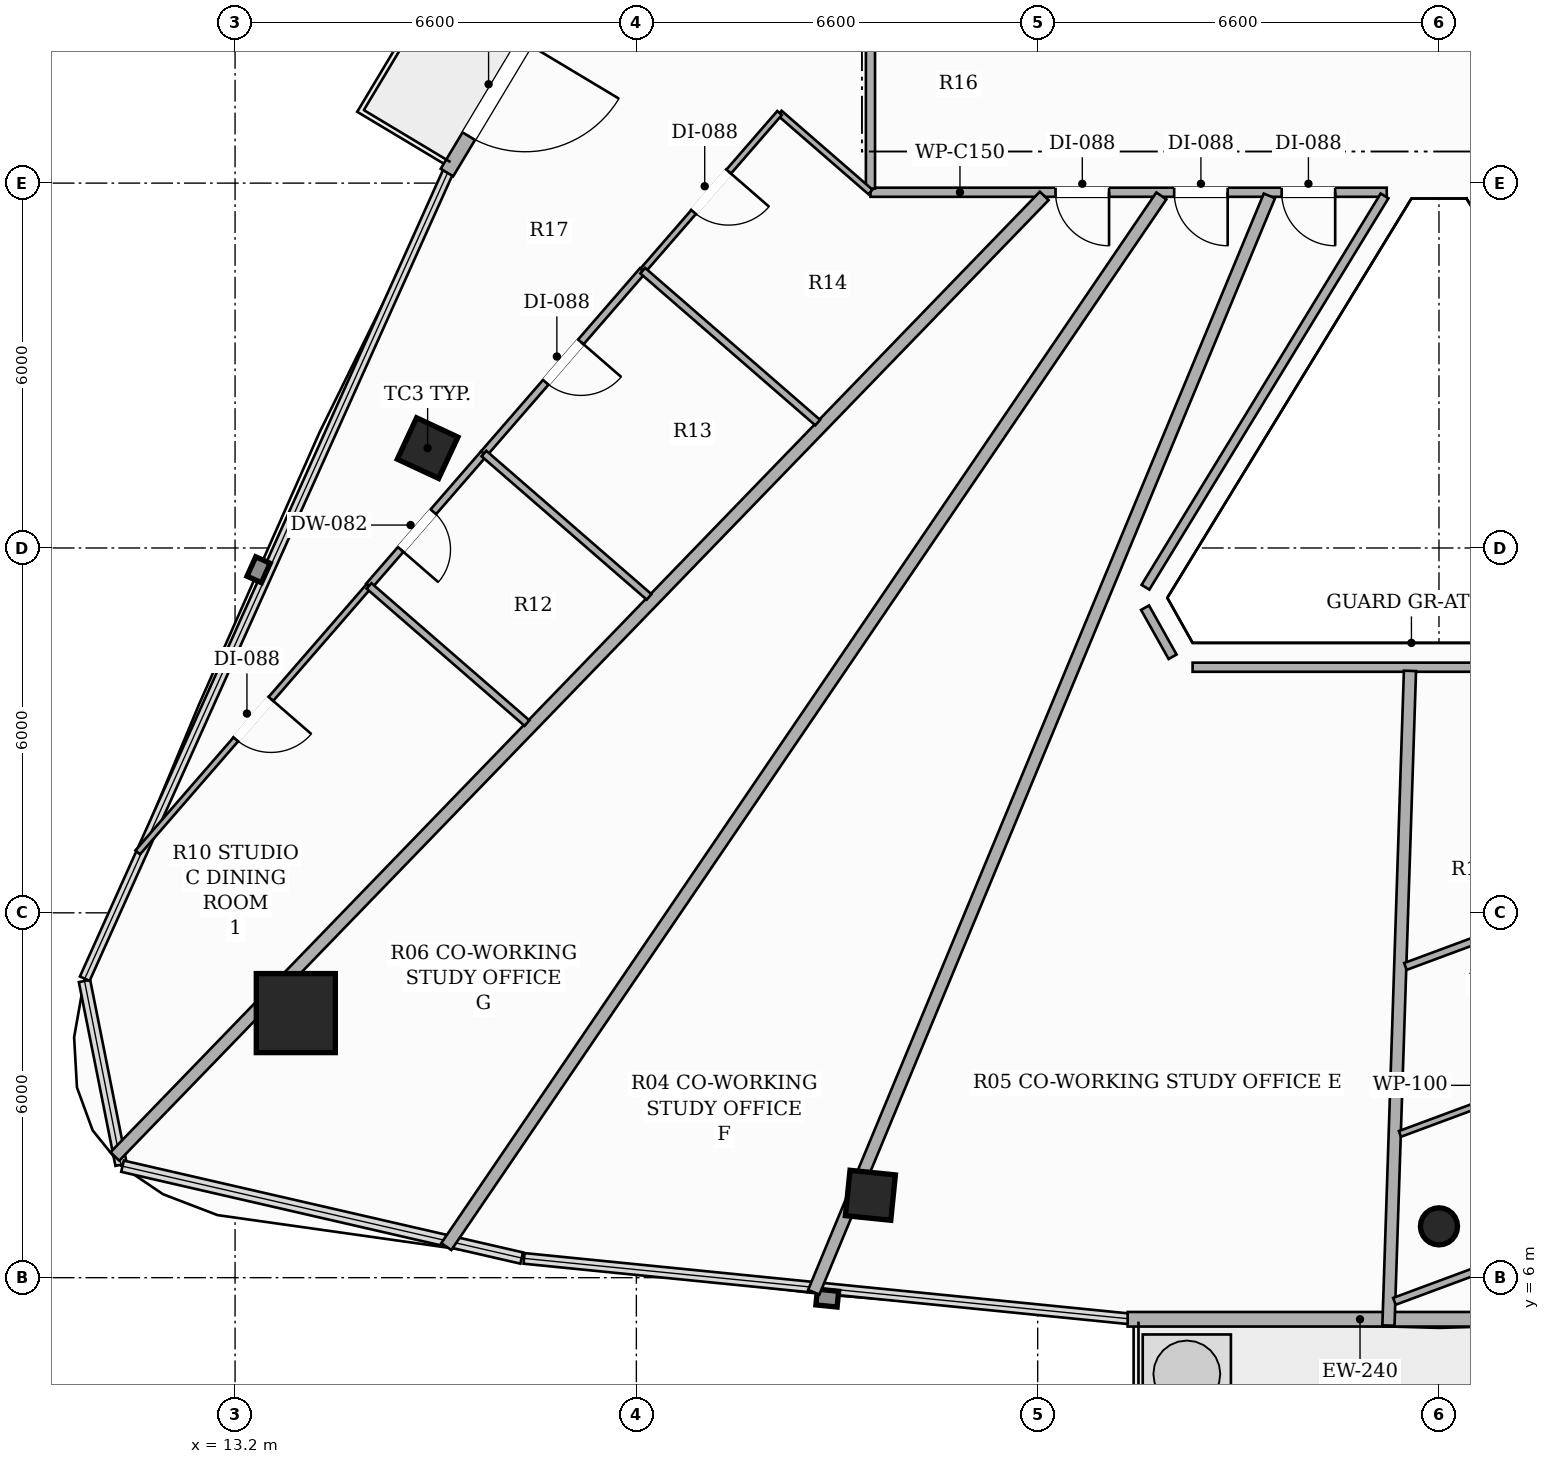
"""IFC4 building model, lengths in metres.
Left out: names, types, materials, properties, quantities, classifications, styles, units other than length and angle.
Written with IfcOpenShell. Run it as: python <this file> out.ifc"""

import sys

from ifc_helpers import new_model, si_unit, direction, frame, frame_2d, origin, origin_2d, place, context, subcontext, project, spatial, rectangle, hollow_rectangle, hollow_circle, extrude, element, fill, save


model = new_model("IFC4")
c1 = context("Model", 3, precision=1e-05, world=origin(), true_north=direction((0.0, 1.0)))
c2 = subcontext(c1, "Body", "Model", "MODEL_VIEW")
j1 = project(units=[si_unit("LENGTHUNIT", "METRE"), si_unit("PLANEANGLEUNIT", "RADIAN")], contexts=[c1])
p1 = place(None, origin())
s1 = spatial("IfcSite", under=j1, at=p1, CompositionType="ELEMENT")
p2 = place(p1, origin())
s2 = spatial("IfcBuilding", under=s1, at=p2, CompositionType="ELEMENT")
p3 = place(p2, frame((0.0, 0.0, 243.65)))
s3 = spatial("IfcBuildingStorey", under=s2, at=p3, CompositionType="ELEMENT", Elevation=243.65)
p4 = place(p3, frame((14.199, 10.351, 0.0), z_axis=(0.0, 0.0, 1.0), x_axis=(1.0, 0.0, 0.0)))
e1 = element("IfcColumn", 1, at=p4, inside=s3, PredefinedType="COLUMN", context=c2, shape_type="SweptSolid", body=[
    extrude(hollow_rectangle(XDim=1.3, YDim=1.3, WallThickness=0.04, at=origin_2d()), origin(), (0.0, 0.0, 1.0), 3.3),
])
for number, where, z_axis, x_axis in (
    (2, (16.367, 19.642, 0.0), (0.0, 0.0, 1.0), (0.423, 0.906, 0.0)),
    (3, (23.649, 7.355, 0.0), (0.0, 0.0, 1.0), (-0.995, 0.101, 0.0)),
):
    element("IfcColumn", number, at=place(p3, frame(where, z_axis=z_axis, x_axis=x_axis)), inside=s3, PredefinedType="COLUMN", context=c2, shape_type="SweptSolid", body=[
        extrude(hollow_rectangle(XDim=0.75, YDim=0.75, WallThickness=0.025, at=origin_2d()), origin(), (0.0, 0.0, 1.0), 3.3),
    ])
p5 = place(p3, frame((33.0, 6.844, 0.0), z_axis=(0.0, 0.0, 1.0), x_axis=(1.0, 0.0, 0.0)))
e4 = element("IfcColumn", 4, at=p5, inside=s3, PredefinedType="COLUMN", context=c2, shape_type="SweptSolid", body=[
    extrude(hollow_circle(Radius=0.305, WallThickness=0.016, at=origin_2d()), origin(), (0.0, 0.0, 1.0), 3.3),
])
p6 = place(p3, frame((21.775, 32.66, 0.0), z_axis=(0.0, 0.0, 1.0), x_axis=(-0.514372387577, -0.857566934354, 0.0)))
e5 = element("IfcWall", 5, at=p6, inside=s3, PredefinedType="SOLIDWALL", context=c2, shape_type="SweptSolid", body=[
    extrude(rectangle(XDim=9.895, YDim=0.24, at=frame_2d((4.948, 0.0))), origin(), (0.0, 0.0, 1.0), 2.624),
])
p7 = place(p6, frame((7.398, 0.0, 0.0)))
e6 = element("IfcOpeningElement", 6, at=p7, cuts=e5, PredefinedType="OPENING", context=c2, shape_type="SweptSolid", body=[
    extrude(rectangle(XDim=1.8, YDim=2.2, at=frame_2d((0.9, 1.1))), frame((0.0, 0.13, 0.0), z_axis=(0.0, -1.0, 0.0), x_axis=(1.0, 0.0, 0.0)), (0.0, 0.0, 1.0), 0.26),
])
p8 = place(p3, frame((27.88, 5.316, 0.0), z_axis=(0.0, 0.0, 1.0), x_axis=(1.0, 0.0, 0.0)))
e7 = element("IfcWall", 7, at=p8, inside=s3, PredefinedType="SOLIDWALL", context=c2, shape_type="SweptSolid", body=[
    extrude(rectangle(XDim=10.24, YDim=0.24, at=frame_2d((5.12, 0.0))), origin(), (0.0, 0.0, 1.0), 2.624),
])
p9 = place(p8, frame((7.743, 0.0, 0.0)))
e8 = element("IfcOpeningElement", 8, at=p9, cuts=e7, PredefinedType="OPENING", context=c2, shape_type="SweptSolid", body=[
    extrude(rectangle(XDim=1.8, YDim=2.2, at=frame_2d((0.9, 1.1))), frame((0.0, 0.13, 0.0), z_axis=(0.0, -1.0, 0.0), x_axis=(1.0, 0.0, 0.0)), (0.0, 0.0, 1.0), 0.26),
])
p10 = place(p3, frame((32.141, 23.85, 0.0), z_axis=(0.0, 0.0, 1.0), x_axis=(-1.0, 0.0, 0.0)))
e9 = element("IfcWall", 9, at=p10, inside=s3, PredefinedType="PARTITIONING", context=c2, shape_type="SweptSolid", body=[
    extrude(rectangle(XDim=8.491, YDim=0.15, at=frame_2d((4.246, 0.0))), origin(), (0.0, 0.0, 1.0), 2.565),
])
p11 = place(p10, frame((0.848, 0.0, 0.0)))
e10 = element("IfcOpeningElement", 10, at=p11, cuts=e9, PredefinedType="OPENING", context=c2, shape_type="SweptSolid", body=[
    extrude(rectangle(XDim=0.88, YDim=2.1, at=frame_2d((0.44, 1.05))), frame((0.0, 0.085, 0.0), z_axis=(0.0, -1.0, 0.0), x_axis=(1.0, 0.0, 0.0)), (0.0, 0.0, 1.0), 0.17),
])
p12 = place(p10, frame((2.616, 0.0, 0.0)))
e11 = element("IfcOpeningElement", 11, at=p12, cuts=e9, PredefinedType="OPENING", context=c2, shape_type="SweptSolid", body=[
    extrude(rectangle(XDim=0.88, YDim=2.1, at=frame_2d((0.44, 1.05))), frame((0.0, 0.085, 0.0), z_axis=(0.0, -1.0, 0.0), x_axis=(1.0, 0.0, 0.0)), (0.0, 0.0, 1.0), 0.17),
])
p13 = place(p10, frame((4.567, 0.0, 0.0)))
e12 = element("IfcOpeningElement", 12, at=p13, cuts=e9, PredefinedType="OPENING", context=c2, shape_type="SweptSolid", body=[
    extrude(rectangle(XDim=0.88, YDim=2.1, at=frame_2d((0.44, 1.05))), frame((0.0, 0.085, 0.0), z_axis=(0.0, -1.0, 0.0), x_axis=(1.0, 0.0, 0.0)), (0.0, 0.0, 1.0), 0.17),
])
p14 = place(p3, frame((23.65, 23.91, 0.0), z_axis=(0.0, 0.0, 1.0), x_axis=(0.0, 1.0, 0.0)))
e13 = element("IfcWall", 13, at=p14, inside=s3, PredefinedType="PARTITIONING", context=c2, shape_type="SweptSolid", body=[
    extrude(rectangle(XDim=11.337, YDim=0.15, at=frame_2d((5.668, 0.0))), origin(), (0.0, 0.0, 1.0), 2.492),
])
p15 = place(p14, frame((4.694, 0.0, 0.0)))
e14 = element("IfcOpeningElement", 14, at=p15, cuts=e13, PredefinedType="OPENING", context=c2, shape_type="SweptSolid", body=[
    extrude(rectangle(XDim=0.92, YDim=2.15, at=frame_2d((0.46, 1.075))), frame((0.0, 0.085, 0.0), z_axis=(0.0, -1.0, 0.0), x_axis=(1.0, 0.0, 0.0)), (0.0, 0.0, 1.0), 0.17),
])
p16 = place(p3, frame((37.052, 16.039, 0.0), z_axis=(0.0, 0.0, 1.0), x_axis=(-1.0, 0.0, 0.0)))
e15 = element("IfcWall", 15, at=p16, inside=s3, PredefinedType="PARTITIONING", context=c2, shape_type="SweptSolid", body=[
    extrude(rectangle(XDim=8.104, YDim=0.15, at=frame_2d((4.052, 0.0))), origin(), (0.0, 0.0, 1.0), 2.773),
])
p17 = place(p3, frame((28.619, 16.211, 0.0), z_axis=(0.0, 0.0, 1.0), x_axis=(-0.489334167997, 0.872096366252, 0.0)))
e16 = element("IfcWall", 16, at=p17, inside=s3, PredefinedType="PARTITIONING", context=c2, shape_type="SweptSolid", body=[
    extrude(rectangle(XDim=0.926, YDim=0.15, at=frame_2d((0.463, 0.0))), origin(), (0.0, 0.0, 1.0), 3.06),
])
p18 = place(p3, frame((28.173, 17.354, 0.0), z_axis=(0.0, 0.0, 1.0), x_axis=(0.521329541742, 0.85335544113, 0.0)))
e17 = element("IfcWall", 17, at=p18, inside=s3, PredefinedType="PARTITIONING", context=c2, shape_type="SweptSolid", body=[
    extrude(rectangle(XDim=7.542, YDim=0.15, at=frame_2d((3.771, 0.0))), origin(), (0.0, 0.0, 1.0), 2.773),
])
p19 = place(p3, frame((32.169, 5.213, 0.0), z_axis=(0.0, 0.0, 1.0), x_axis=(0.032863548895, 0.999459847695, 0.0)))
e18 = element("IfcWall", 18, at=p19, inside=s3, PredefinedType="PARTITIONING", context=c2, shape_type="SweptSolid", body=[
    extrude(rectangle(XDim=10.772, YDim=0.2, at=frame_2d((5.386, 0.0))), origin(), (0.0, 0.0, 1.0), 2.492),
])
p20 = place(p3, frame((26.508, 23.79, 0.0), z_axis=(0.0, 0.0, 1.0), x_axis=(-0.695365551949, -0.71865621069, 0.0)))
e19 = element("IfcWall", 19, at=p20, inside=s3, PredefinedType="PARTITIONING", context=c2, shape_type="SweptSolid", body=[
    extrude(rectangle(XDim=21.981, YDim=0.2, at=frame_2d((10.991, 0.0))), origin(), (0.0, 0.0, 1.0), 2.492),
])
p21 = place(p3, frame((22.717, 5.761, 0.0), z_axis=(0.0, 0.0, 1.0), x_axis=(0.383820587854, 0.923407686961, 0.0)))
e20 = element("IfcWall", 20, at=p21, inside=s3, PredefinedType="PARTITIONING", context=c2, shape_type="SweptSolid", body=[
    extrude(rectangle(XDim=19.524, YDim=0.2, at=frame_2d((9.762, 0.0))), origin(), (0.0, 0.0, 1.0), 2.492),
])
p22 = place(p3, frame((16.674, 6.511, 0.0), z_axis=(0.0, 0.0, 1.0), x_axis=(0.562645442508, 0.82669831621, 0.0)))
e21 = element("IfcWall", 21, at=p22, inside=s3, PredefinedType="PARTITIONING", context=c2, shape_type="SweptSolid", body=[
    extrude(rectangle(XDim=20.901, YDim=0.2, at=frame_2d((10.451, 0.0))), origin(), (0.0, 0.0, 1.0), 2.492),
])
p23 = place(p3, frame((35.781, 12.353, 0.0), z_axis=(0.0, 0.0, 1.0), x_axis=(-0.937688263894, -0.347477653607, 0.0)))
e22 = element("IfcWall", 22, at=p23, inside=s3, PredefinedType="PARTITIONING", context=c2, shape_type="SweptSolid", body=[
    extrude(rectangle(XDim=3.554, YDim=0.12, at=frame_2d((1.777, 0.0))), origin(), (0.0, 0.0, 1.0), 2.773),
])
p24 = place(p3, frame((32.267, 5.611, 0.0), z_axis=(0.0, 0.0, 1.0), x_axis=(0.937641120959, 0.347604845027, 0.0)))
e23 = element("IfcWall", 23, at=p24, inside=s3, PredefinedType="PARTITIONING", context=c2, shape_type="SweptSolid", body=[
    extrude(rectangle(XDim=5.638, YDim=0.12, at=frame_2d((2.819, 0.0))), origin(), (0.0, 0.0, 1.0), 2.492),
])
p25 = place(p3, frame((32.358, 8.364, 0.0), z_axis=(0.0, 0.0, 1.0), x_axis=(0.937636593966, 0.34761705605, 0.0)))
e24 = element("IfcWall", 24, at=p25, inside=s3, PredefinedType="PARTITIONING", context=c2, shape_type="SweptSolid", body=[
    extrude(rectangle(XDim=4.597, YDim=0.1, at=frame_2d((2.298, 0.0))), origin(), (0.0, 0.0, 1.0), 2.773),
])
p26 = place(p3, frame((17.293, 19.553, 0.0), z_axis=(0.0, 0.0, 1.0), x_axis=(-0.655555788219, -0.755146746357, 0.0)))
e25 = element("IfcWall", 25, at=p26, inside=s3, PredefinedType="PARTITIONING", context=c2, shape_type="SweptSolid", body=[
    extrude(rectangle(XDim=2.883, YDim=0.12, at=frame_2d((1.441, 0.0))), origin(), (0.0, 0.0, 1.0), 2.492),
])
p27 = place(p26, frame((1.269, 0.0, 0.0)))
e26 = element("IfcOpeningElement", 26, at=p27, cuts=e25, PredefinedType="OPENING", context=c2, shape_type="SweptSolid", body=[
    extrude(rectangle(XDim=0.82, YDim=2.1, at=frame_2d((0.41, 1.05))), frame((0.0, 0.07, 0.0), z_axis=(0.0, -1.0, 0.0), x_axis=(1.0, 0.0, 0.0)), (0.0, 0.0, 1.0), 0.14),
])
p28 = place(p3, frame((19.904, 22.561, 0.0), z_axis=(0.0, 0.0, 1.0), x_axis=(-0.655518370372, -0.755179227803, 0.0)))
e27 = element("IfcWall", 27, at=p28, inside=s3, PredefinedType="PARTITIONING", context=c2, shape_type="SweptSolid", body=[
    extrude(rectangle(XDim=3.983, YDim=0.12, at=frame_2d((1.992, 0.0))), origin(), (0.0, 0.0, 1.0), 2.773),
])
p29 = place(p28, frame((1.552, 0.0, 0.0)))
e28 = element("IfcOpeningElement", 28, at=p29, cuts=e27, PredefinedType="OPENING", context=c2, shape_type="SweptSolid", body=[
    extrude(rectangle(XDim=0.88, YDim=2.1, at=frame_2d((0.44, 1.05))), frame((0.0, 0.07, 0.0), z_axis=(0.0, -1.0, 0.0), x_axis=(1.0, 0.0, 0.0)), (0.0, 0.0, 1.0), 0.14),
])
p30 = place(p3, frame((15.403, 17.376, 0.0), z_axis=(0.0, 0.0, 1.0), x_axis=(-0.655535791639, -0.755164105265, 0.0)))
e29 = element("IfcWall", 29, at=p30, inside=s3, PredefinedType="PARTITIONING", context=c2, shape_type="SweptSolid", body=[
    extrude(rectangle(XDim=5.803, YDim=0.1, at=frame_2d((2.901, 0.0))), origin(), (0.0, 0.0, 1.0), 2.492),
])
p31 = place(p30, frame((2.461, 0.0, 0.0)))
e30 = element("IfcOpeningElement", 30, at=p31, cuts=e29, PredefinedType="OPENING", context=c2, shape_type="SweptSolid", body=[
    extrude(rectangle(XDim=0.88, YDim=2.1, at=frame_2d((0.44, 1.05))), frame((0.0, 0.06, 0.0), z_axis=(0.0, -1.0, 0.0), x_axis=(1.0, 0.0, 0.0)), (0.0, 0.0, 1.0), 0.12),
])
p32 = place(p3, frame((23.65, 23.855, 0.0), z_axis=(0.0, 0.0, 1.0), x_axis=(-0.755054003076, 0.655662605643, 0.0)))
e31 = element("IfcWall", 31, at=p32, inside=s3, PredefinedType="PARTITIONING", context=c2, shape_type="SweptSolid", body=[
    extrude(rectangle(XDim=1.98, YDim=0.1, at=frame_2d((0.99, 0.0))), origin(), (0.0, 0.0, 1.0), 2.773),
])
p33 = place(p3, frame((22.155, 25.153, 0.0), z_axis=(0.0, 0.0, 1.0), x_axis=(-0.655685588572, -0.755034044888, 0.0)))
e32 = element("IfcWall", 32, at=p33, inside=s3, PredefinedType="PARTITIONING", context=c2, shape_type="SweptSolid", body=[
    extrude(rectangle(XDim=3.433, YDim=0.1, at=frame_2d((1.717, 0.0))), origin(), (0.0, 0.0, 1.0), 2.773),
])
p34 = place(p33, frame((1.276, 0.0, 0.0)))
e33 = element("IfcOpeningElement", 33, at=p34, cuts=e32, PredefinedType="OPENING", context=c2, shape_type="SweptSolid", body=[
    extrude(rectangle(XDim=0.88, YDim=2.1, at=frame_2d((0.44, 1.05))), frame((0.0, 0.06, 0.0), z_axis=(0.0, -1.0, 0.0), x_axis=(1.0, 0.0, 0.0)), (0.0, 0.0, 1.0), 0.12),
])
p35 = place(p3, frame((17.293, 19.553, 0.0), z_axis=(0.0, 0.0, 1.0), x_axis=(0.755140110276, -0.655563432364, 0.0)))
e34 = element("IfcWall", 34, at=p35, inside=s3, PredefinedType="PARTITIONING", context=c2, shape_type="SweptSolid", body=[
    extrude(rectangle(XDim=3.597, YDim=0.12, at=frame_2d((1.798, 0.0))), origin(), (0.0, 0.0, 1.0), 2.565),
])
p36 = place(p3, frame((18.001, 15.12, 0.0), z_axis=(0.0, 0.0, 1.0), x_axis=(-0.755063624175, 0.655651525925, 0.0)))
e35 = element("IfcWall", 35, at=p36, inside=s3, PredefinedType="PARTITIONING", context=c2, shape_type="SweptSolid", body=[
    extrude(rectangle(XDim=3.441, YDim=0.12, at=frame_2d((1.72, 0.0))), origin(), (0.0, 0.0, 1.0), 2.492),
])
p37 = place(p3, frame((19.904, 22.561, 0.0), z_axis=(0.0, 0.0, 1.0), x_axis=(0.755063159293, -0.655652061293, 0.0)))
e36 = element("IfcWall", 36, at=p37, inside=s3, PredefinedType="PARTITIONING", context=c2, shape_type="SweptSolid", body=[
    extrude(rectangle(XDim=3.812, YDim=0.12, at=frame_2d((1.906, 0.0))), origin(), (0.0, 0.0, 1.0), 2.565),
])
p38 = place(p7, origin())
e37 = element("IfcDoor", 37, at=p38, inside=s3, OperationType="SINGLE_SWING_LEFT", PredefinedType="DOOR", context=c2, shape_type="SweptSolid", body=[
    extrude(rectangle(XDim=1.8, YDim=2.2, at=frame_2d((0.9, 1.1))), frame((0.0, 0.025, 0.0), z_axis=(0.0, -1.0, 0.0), x_axis=(1.0, 0.0, 0.0)), (0.0, 0.0, 1.0), 0.05),
])
fill(e6, e37)
p39 = place(p27, origin())
e38 = element("IfcDoor", 38, at=p39, inside=s3, OperationType="SINGLE_SWING_RIGHT", PredefinedType="DOOR", context=c2, shape_type="SweptSolid", body=[
    extrude(rectangle(XDim=0.82, YDim=2.1, at=frame_2d((0.41, 1.05))), frame((0.0, 0.025, 0.0), z_axis=(0.0, -1.0, 0.0), x_axis=(1.0, 0.0, 0.0)), (0.0, 0.0, 1.0), 0.05),
])
fill(e26, e38)
p40 = place(p29, origin())
e39 = element("IfcDoor", 39, at=p40, inside=s3, OperationType="SINGLE_SWING_LEFT", PredefinedType="DOOR", context=c2, shape_type="SweptSolid", body=[
    extrude(rectangle(XDim=0.88, YDim=2.1, at=frame_2d((0.44, 1.05))), frame((0.0, 0.025, 0.0), z_axis=(0.0, -1.0, 0.0), x_axis=(1.0, 0.0, 0.0)), (0.0, 0.0, 1.0), 0.05),
])
fill(e28, e39)
p41 = place(p31, origin())
e40 = element("IfcDoor", 40, at=p41, inside=s3, OperationType="SINGLE_SWING_LEFT", PredefinedType="DOOR", context=c2, shape_type="SweptSolid", body=[
    extrude(rectangle(XDim=0.88, YDim=2.1, at=frame_2d((0.44, 1.05))), frame((0.0, 0.025, 0.0), z_axis=(0.0, -1.0, 0.0), x_axis=(1.0, 0.0, 0.0)), (0.0, 0.0, 1.0), 0.05),
])
fill(e30, e40)
p42 = place(p34, origin())
e41 = element("IfcDoor", 41, at=p42, inside=s3, OperationType="SINGLE_SWING_LEFT", PredefinedType="DOOR", context=c2, shape_type="SweptSolid", body=[
    extrude(rectangle(XDim=0.88, YDim=2.1, at=frame_2d((0.44, 1.05))), frame((0.0, 0.025, 0.0), z_axis=(0.0, -1.0, 0.0), x_axis=(1.0, 0.0, 0.0)), (0.0, 0.0, 1.0), 0.05),
])
fill(e33, e41)
p43 = place(p11, origin())
e42 = element("IfcDoor", 42, at=p43, inside=s3, OperationType="SINGLE_SWING_LEFT", PredefinedType="DOOR", context=c2, shape_type="SweptSolid", body=[
    extrude(rectangle(XDim=0.88, YDim=2.1, at=frame_2d((0.44, 1.05))), frame((0.0, 0.025, 0.0), z_axis=(0.0, -1.0, 0.0), x_axis=(1.0, 0.0, 0.0)), (0.0, 0.0, 1.0), 0.05),
])
fill(e10, e42)
p44 = place(p12, origin())
e43 = element("IfcDoor", 43, at=p44, inside=s3, OperationType="SINGLE_SWING_LEFT", PredefinedType="DOOR", context=c2, shape_type="SweptSolid", body=[
    extrude(rectangle(XDim=0.88, YDim=2.1, at=frame_2d((0.44, 1.05))), frame((0.0, 0.025, 0.0), z_axis=(0.0, -1.0, 0.0), x_axis=(1.0, 0.0, 0.0)), (0.0, 0.0, 1.0), 0.05),
])
fill(e11, e43)
p45 = place(p13, origin())
e44 = element("IfcDoor", 44, at=p45, inside=s3, OperationType="SINGLE_SWING_LEFT", PredefinedType="DOOR", context=c2, shape_type="SweptSolid", body=[
    extrude(rectangle(XDim=0.88, YDim=2.1, at=frame_2d((0.44, 1.05))), frame((0.0, 0.025, 0.0), z_axis=(0.0, -1.0, 0.0), x_axis=(1.0, 0.0, 0.0)), (0.0, 0.0, 1.0), 0.05),
])
fill(e12, e44)
save(model, sys.argv[1])
